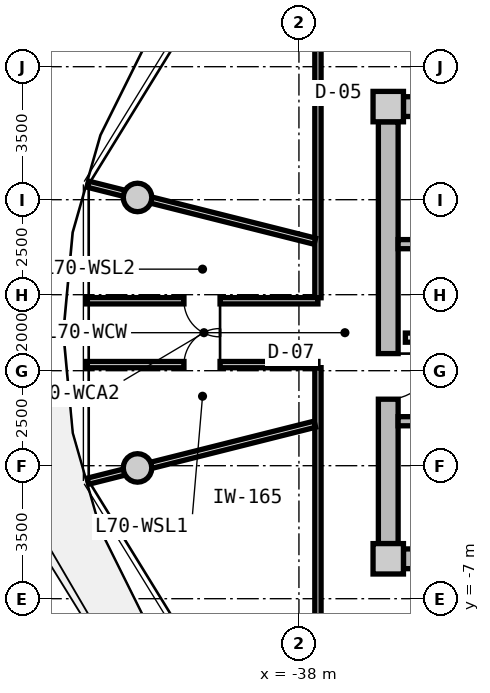
"""IFC4 building model, lengths in metres.
Left out: names, types, materials, properties, quantities, classifications, styles, units other than length and angle.
Written with IfcOpenShell. Run it as: python <this file> out.ifc"""

import sys

from ifc_helpers import new_model, si_unit, direction, frame, frame_2d, origin, origin_2d, place, context, subcontext, project, spatial, rectangle, circle, extrude, source, transform, mapped, element, fill, save


model = new_model("IFC4")
c1 = context("Model", 3, precision=1e-05, world=origin(), true_north=direction((0.0, 1.0)))
c2 = subcontext(c1, "Body", "Model", "MODEL_VIEW")
j1 = project(units=[si_unit("LENGTHUNIT", "METRE"), si_unit("PLANEANGLEUNIT", "RADIAN")], contexts=[c1])
p1 = place(None, origin())
s1 = spatial("IfcSite", under=j1, at=p1, CompositionType="ELEMENT")
p2 = place(p1, origin())
s2 = spatial("IfcBuilding", under=s1, at=p2, CompositionType="ELEMENT")
p3 = place(p2, frame((0.0, 0.0, 226.1)))
s3 = spatial("IfcBuildingStorey", under=s2, at=p3, CompositionType="ELEMENT", Elevation=226.1)
m1 = source(origin(), c2, "Body", "SweptSolid", [
    extrude(rectangle(XDim=0.8, YDim=0.8, at=origin_2d()), origin(), (0.0, 0.0, 1.0), 3.05),
])
for number, where, z_axis, x_axis in (
    (1, (-35.65, -5.95, 0.0), (0.0, 0.0, 1.0), (1.0, 0.0, 0.0)),
    (2, (-35.65, 5.95, 0.0), (0.0, 0.0, 1.0), (1.0, 0.0, 0.0)),
):
    element("IfcColumn", number, at=place(p3, frame(where, z_axis=z_axis, x_axis=x_axis)), inside=s3, PredefinedType="COLUMN", context=c2, shape_type="MappedRepresentation", body=[
        mapped(m1, transform((0.0, 0.0, 0.0), x_axis=(1.0, 0.0, 0.0), y_axis=(0.0, 1.0, 0.0), z_axis=(0.0, 0.0, 1.0), scale=1.0)),
    ])
m2 = source(origin(), c2, "Body", "SweptSolid", [
    extrude(rectangle(XDim=14.5, YDim=0.52, at=frame_2d((7.25, 0.0))), origin(), (0.0, 0.0, 1.0), 2.76),
])
for number, where, z_axis, x_axis in (
    (3, (-35.25, 5.95, 0.0), (0.0, 0.0, 1.0), (1.0, 0.0, 0.0)),
    (4, (-20.75, -5.95, 0.0), (0.0, 0.0, 1.0), (-1.0, 0.0, 0.0)),
):
    element("IfcWall", number, at=place(p3, frame(where, z_axis=z_axis, x_axis=x_axis)), inside=s3, PredefinedType="SHEAR", context=c2, shape_type="MappedRepresentation", body=[
        mapped(m2, transform((0.0, 0.0, 0.0), x_axis=(1.0, 0.0, 0.0), y_axis=(0.0, 1.0, 0.0), z_axis=(0.0, 0.0, 1.0), scale=1.0)),
    ])
m3 = source(origin(), c2, "Body", "SweptSolid", [
    extrude(rectangle(XDim=11.1, YDim=0.52, at=frame_2d((5.55, 0.0))), origin(), (0.0, 0.0, 1.0), 2.76),
])
p4 = place(p3, frame((-35.65, -5.55, 0.0), z_axis=(0.0, 0.0, 1.0), x_axis=(0.0, 1.0, 0.0)))
e5 = element("IfcWall", 5, at=p4, inside=s3, PredefinedType="SHEAR", context=c2, shape_type="MappedRepresentation", body=[
    mapped(m3, transform((0.0, 0.0, 0.0), x_axis=(1.0, 0.0, 0.0), y_axis=(0.0, 1.0, 0.0), z_axis=(0.0, 0.0, 1.0), scale=1.0)),
])
p5 = place(p4, frame((3.8, 0.0, 0.0)))
e6 = element("IfcOpeningElement", 6, at=p5, cuts=e5, PredefinedType="OPENING", context=c2, shape_type="SweptSolid", body=[
    extrude(rectangle(XDim=1.2, YDim=2.15, at=frame_2d((0.6, 1.075))), frame((0.0, 0.27, 0.0), z_axis=(0.0, -1.0, 0.0), x_axis=(1.0, 0.0, 0.0)), (0.0, 0.0, 1.0), 0.54),
])
m4 = source(origin(), c2, "Body", "SweptSolid", [
    extrude(circle(Radius=0.375, at=origin_2d()), origin(), (0.0, 0.0, 1.0), 3.05),
])
for number, where, z_axis, x_axis in (
    (7, (-42.247, 3.559, 0.0), (0.0, 0.0, 1.0), (1.0, 0.0, 0.0)),
    (8, (-42.247, -3.559, 0.0), (0.0, 0.0, 1.0), (1.0, 0.0, 0.0)),
):
    element("IfcColumn", number, at=place(p3, frame(where, z_axis=z_axis, x_axis=x_axis)), inside=s3, PredefinedType="COLUMN", context=c2, shape_type="MappedRepresentation", body=[
        mapped(m4, transform((0.0, 0.0, 0.0), x_axis=(1.0, 0.0, 0.0), y_axis=(0.0, 1.0, 0.0), z_axis=(0.0, 0.0, 1.0), scale=1.0)),
    ])
m5 = source(origin(), c2, "Body", "SweptSolid", [
    extrude(rectangle(XDim=7.93, YDim=0.24, at=frame_2d((3.965, 0.0))), origin(), (0.0, 0.0, 1.0), 2.76),
])
p6 = place(p3, frame((-35.39, 2.33, 0.0), z_axis=(0.0, 0.0, 1.0), x_axis=(1.0, 0.0, 0.0)))
e9 = element("IfcWall", 9, at=p6, inside=s3, PredefinedType="PARTITIONING", context=c2, shape_type="MappedRepresentation", body=[
    mapped(m5, transform((0.0, 0.0, 0.0), x_axis=(1.0, 0.0, 0.0), y_axis=(0.0, 1.0, 0.0), z_axis=(0.0, 0.0, 1.0), scale=1.0)),
])
p7 = place(p3, frame((-35.39, -2.33, 0.0), z_axis=(0.0, 0.0, 1.0), x_axis=(1.0, 0.0, 0.0)))
e10 = element("IfcWall", 10, at=p7, inside=s3, PredefinedType="PARTITIONING", context=c2, shape_type="MappedRepresentation", body=[
    mapped(m5, transform((0.0, 0.0, 0.0), x_axis=(1.0, 0.0, 0.0), y_axis=(0.0, 1.0, 0.0), z_axis=(0.0, 0.0, 1.0), scale=1.0)),
])
p8 = place(p7, frame((1.05, 0.0, 0.0)))
e11 = element("IfcOpeningElement", 11, at=p8, cuts=e10, PredefinedType="OPENING", context=c2, shape_type="SweptSolid", body=[
    extrude(rectangle(XDim=1.1, YDim=2.15, at=frame_2d((0.55, 1.075))), frame((0.0, 0.13, 0.0), z_axis=(0.0, -1.0, 0.0), x_axis=(1.0, 0.0, 0.0)), (0.0, 0.0, 1.0), 0.26),
])
m6 = source(origin(), c2, "Body", "SweptSolid", [
    extrude(rectangle(XDim=7.62, YDim=0.24, at=frame_2d((3.81, 0.0))), origin(), (0.0, 0.0, 1.0), 2.745),
])
p9 = place(p3, frame((-35.2, -0.13, 0.0), z_axis=(0.0, 0.0, 1.0), x_axis=(1.0, 0.0, 0.0)))
e12 = element("IfcWall", 12, at=p9, inside=s3, PredefinedType="PARTITIONING", context=c2, shape_type="MappedRepresentation", body=[
    mapped(m6, transform((0.0, 0.0, 0.0), x_axis=(1.0, 0.0, 0.0), y_axis=(0.0, 1.0, 0.0), z_axis=(0.0, 0.0, 1.0), scale=1.0)),
])
p10 = place(p9, frame((6.22, 0.0, 0.0)))
e13 = element("IfcOpeningElement", 13, at=p10, cuts=e12, PredefinedType="OPENING", context=c2, shape_type="SweptSolid", body=[
    extrude(rectangle(XDim=1.0, YDim=2.1, at=frame_2d((0.5, 1.05))), frame((0.0, 0.13, 0.0), z_axis=(0.0, -1.0, 0.0), x_axis=(1.0, 0.0, 0.0)), (0.0, 0.0, 1.0), 0.26),
])
p11 = place(p9, frame((2.4, 0.0, 0.0)))
e14 = element("IfcOpeningElement", 14, at=p11, cuts=e12, PredefinedType="OPENING", context=c2, shape_type="SweptSolid", body=[
    extrude(rectangle(XDim=1.0, YDim=2.1, at=frame_2d((0.5, 1.05))), frame((0.0, 0.13, 0.0), z_axis=(0.0, -1.0, 0.0), x_axis=(1.0, 0.0, 0.0)), (0.0, 0.0, 1.0), 0.26),
])
m7 = source(origin(), c2, "Body", "SweptSolid", [
    extrude(rectangle(XDim=6.88, YDim=0.165, at=frame_2d((3.44, 0.0))), origin(), (0.0, 0.0, 1.0), 2.745),
])
for number, where, z_axis, x_axis in (
    (15, (-37.5, -7.8, 0.0), (0.0, 0.0, 1.0), (0.0, 1.0, 0.0)),
    (16, (-37.5, 0.92, 0.0), (0.0, 0.0, 1.0), (0.0, 1.0, 0.0)),
):
    element("IfcWall", number, at=place(p3, frame(where, z_axis=z_axis, x_axis=x_axis)), inside=s3, PredefinedType="PARTITIONING", context=c2, shape_type="MappedRepresentation", body=[
        mapped(m7, transform((0.0, 0.0, 0.0), x_axis=(1.0, 0.0, 0.0), y_axis=(0.0, 1.0, 0.0), z_axis=(0.0, 0.0, 1.0), scale=1.0)),
    ])
m8 = source(origin(), c2, "Body", "SweptSolid", [
    extrude(rectangle(XDim=6.157, YDim=0.165, at=frame_2d((3.079, 0.0))), origin(), (0.0, 0.0, 1.0), 2.345),
])
for number, where, z_axis, x_axis in (
    (17, (-37.58, 2.407, 0.0), (0.0, 0.0, 1.0), (-0.97, 0.244, 0.0)),
    (18, (-37.58, -2.407, 0.0), (0.0, 0.0, 1.0), (-0.97, -0.244, 0.0)),
):
    element("IfcWall", number, at=place(p3, frame(where, z_axis=z_axis, x_axis=x_axis)), inside=s3, PredefinedType="PARTITIONING", context=c2, shape_type="MappedRepresentation", body=[
        mapped(m8, transform((0.0, 0.0, 0.0), x_axis=(1.0, 0.0, 0.0), y_axis=(0.0, 1.0, 0.0), z_axis=(0.0, 0.0, 1.0), scale=1.0)),
    ])
m9 = source(origin(), c2, "Body", "SweptSolid", [
    extrude(rectangle(XDim=6.101, YDim=0.165, at=frame_2d((3.051, 0.0))), origin(), (0.0, 0.0, 1.0), 2.745),
])
p12 = place(p3, frame((-43.601, 0.84, 0.0), z_axis=(0.0, 0.0, 1.0), x_axis=(1.0, 0.0, 0.0)))
e19 = element("IfcWall", 19, at=p12, inside=s3, PredefinedType="PARTITIONING", context=c2, shape_type="MappedRepresentation", body=[
    mapped(m9, transform((0.0, 0.0, 0.0), x_axis=(1.0, 0.0, 0.0), y_axis=(0.0, 1.0, 0.0), z_axis=(0.0, 0.0, 1.0), scale=1.0)),
])
p13 = place(p12, frame((2.576, 0.0, 0.0)))
e20 = element("IfcOpeningElement", 20, at=p13, cuts=e19, PredefinedType="OPENING", context=c2, shape_type="SweptSolid", body=[
    extrude(rectangle(XDim=0.95, YDim=2.1, at=frame_2d((0.475, 1.05))), frame((0.0, 0.093, 0.0), z_axis=(0.0, -1.0, 0.0), x_axis=(1.0, 0.0, 0.0)), (0.0, 0.0, 1.0), 0.185),
])
p14 = place(p3, frame((-37.5, -0.84, 0.0), z_axis=(0.0, 0.0, 1.0), x_axis=(-1.0, 0.0, 0.0)))
e21 = element("IfcWall", 21, at=p14, inside=s3, PredefinedType="PARTITIONING", context=c2, shape_type="MappedRepresentation", body=[
    mapped(m9, transform((0.0, 0.0, 0.0), x_axis=(1.0, 0.0, 0.0), y_axis=(0.0, 1.0, 0.0), z_axis=(0.0, 0.0, 1.0), scale=1.0)),
])
p15 = place(p14, frame((2.576, 0.0, 0.0)))
e22 = element("IfcOpeningElement", 22, at=p15, cuts=e21, PredefinedType="OPENING", context=c2, shape_type="SweptSolid", body=[
    extrude(rectangle(XDim=0.95, YDim=2.1, at=frame_2d((0.475, 1.05))), frame((0.0, 0.093, 0.0), z_axis=(0.0, -1.0, 0.0), x_axis=(1.0, 0.0, 0.0)), (0.0, 0.0, 1.0), 0.185),
])
m10 = source(origin(), c2, "Body", "SweptSolid", [
    extrude(rectangle(XDim=1.2, YDim=2.15, at=frame_2d((0.6, 1.075))), frame((0.0, 0.025, 0.0), z_axis=(0.0, -1.0, 0.0), x_axis=(1.0, 0.0, 0.0)), (0.0, 0.0, 1.0), 0.05),
])
p16 = place(p5, frame((1.2, 0.0, 0.0), z_axis=(0.0, 0.0, 1.0), x_axis=(-1.0, 0.0, 0.0)))
e23 = element("IfcDoor", 23, at=p16, inside=s3, OperationType="SINGLE_SWING_LEFT", PredefinedType="DOOR", context=c2, shape_type="MappedRepresentation", body=[
    mapped(m10, transform((0.0, 0.0, 0.0), x_axis=(1.0, 0.0, 0.0), y_axis=(0.0, 1.0, 0.0), z_axis=(0.0, 0.0, 1.0), scale=1.0)),
])
fill(e6, e23)
m11 = source(origin(), c2, "Body", "SweptSolid", [
    extrude(rectangle(XDim=0.95, YDim=2.1, at=frame_2d((0.475, 1.05))), frame((0.0, 0.025, 0.0), z_axis=(0.0, -1.0, 0.0), x_axis=(1.0, 0.0, 0.0)), (0.0, 0.0, 1.0), 0.05),
])
p17 = place(p15, frame((0.95, 0.0, 0.0), z_axis=(0.0, 0.0, 1.0), x_axis=(-1.0, 0.0, 0.0)))
e24 = element("IfcDoor", 24, at=p17, inside=s3, OperationType="SINGLE_SWING_RIGHT", PredefinedType="DOOR", context=c2, shape_type="MappedRepresentation", body=[
    mapped(m11, transform((0.0, 0.0, 0.0), x_axis=(1.0, 0.0, 0.0), y_axis=(0.0, 1.0, 0.0), z_axis=(0.0, 0.0, 1.0), scale=1.0)),
])
fill(e22, e24)
p18 = place(p13, frame((0.95, 0.0, 0.0), z_axis=(0.0, 0.0, 1.0), x_axis=(-1.0, 0.0, 0.0)))
e25 = element("IfcDoor", 25, at=p18, inside=s3, OperationType="SINGLE_SWING_LEFT", PredefinedType="DOOR", context=c2, shape_type="MappedRepresentation", body=[
    mapped(m11, transform((0.0, 0.0, 0.0), x_axis=(1.0, 0.0, 0.0), y_axis=(0.0, 1.0, 0.0), z_axis=(0.0, 0.0, 1.0), scale=1.0)),
])
fill(e20, e25)
save(model, sys.argv[1])
